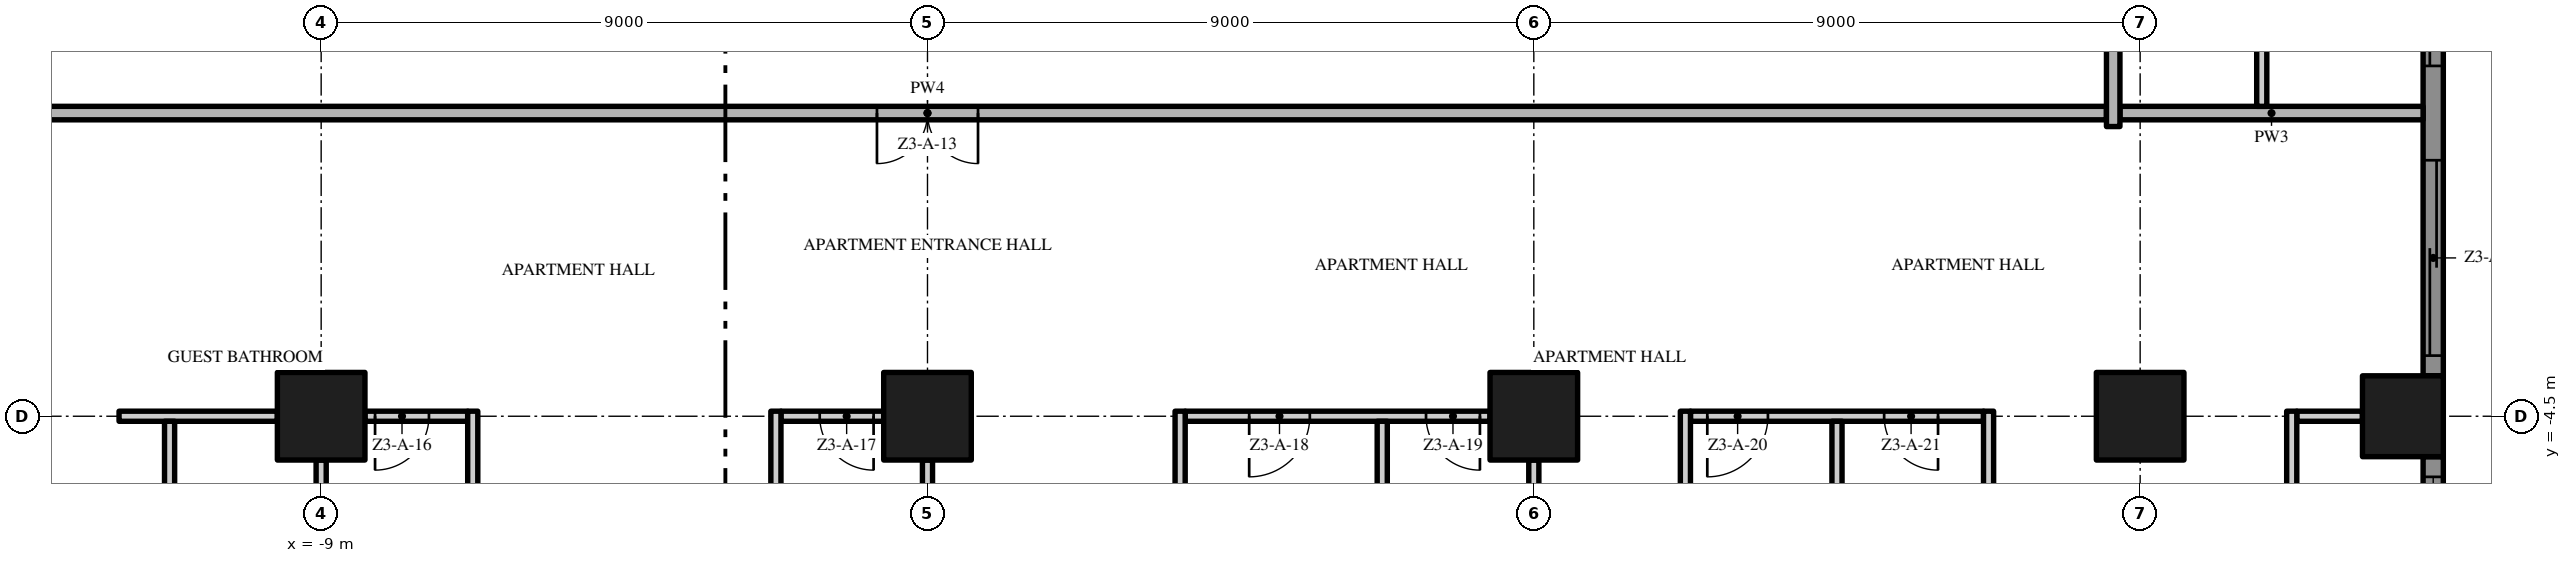
"""IFC4 building model, lengths in metres.
Left out: names, types, materials, properties, quantities, classifications, styles, units other than length and angle.
Written with IfcOpenShell. Run it as: python <this file> out.ifc"""

import sys

from ifc_helpers import new_model, si_unit, direction, frame, frame_2d, origin, origin_2d, place, context, subcontext, project, spatial, polyline, rectangle, outline, extrude, element, fill, save


model = new_model("IFC4")
c1 = context("Model", 3, precision=1e-05, world=origin(), true_north=direction((0.0, 1.0)))
c2 = subcontext(c1, "Body", "Model", "MODEL_VIEW")
j1 = project(units=[si_unit("LENGTHUNIT", "METRE"), si_unit("PLANEANGLEUNIT", "RADIAN")], contexts=[c1])
p1 = place(None, origin())
s1 = spatial("IfcSite", under=j1, at=p1, CompositionType="ELEMENT")
p2 = place(p1, origin())
s2 = spatial("IfcBuilding", under=s1, at=p2, CompositionType="ELEMENT")
p3 = place(p2, frame((0.0, 0.0, 125.0)))
s3 = spatial("IfcBuildingStorey", under=s2, at=p3, CompositionType="ELEMENT", Elevation=125.0)
for number, where, z_axis, x_axis in (
    (1, (-9.0, -4.5, 0.0), (0.0, 0.0, 1.0), (1.0, 0.0, 0.0)),
    (2, (0.0, -4.5, 0.0), (0.0, 0.0, 1.0), (1.0, 0.0, 0.0)),
    (3, (18.0, -4.5, 0.0), (0.0, 0.0, 1.0), (1.0, 0.0, 0.0)),
):
    element("IfcColumn", number, at=place(p3, frame(where, z_axis=z_axis, x_axis=x_axis)), inside=s3, PredefinedType="COLUMN", context=c2, shape_type="SweptSolid", body=[
        extrude(rectangle(XDim=1.3, YDim=1.3, at=origin_2d()), origin(), (0.0, 0.0, 1.0), 3.5),
    ])
p4 = place(p3, frame((21.9, -4.5, 0.0), z_axis=(0.0, 0.0, 1.0), x_axis=(1.0, 0.0, 0.0)))
e4 = element("IfcColumn", 4, at=p4, inside=s3, PredefinedType="COLUMN", context=c2, shape_type="SweptSolid", body=[
    extrude(rectangle(XDim=1.2, YDim=1.2, at=origin_2d()), origin(), (0.0, 0.0, 1.0), 3.5),
])
p5 = place(p3, frame((9.0, -4.5, 0.0), z_axis=(0.0, 0.0, 1.0), x_axis=(1.0, 0.0, 0.0)))
e5 = element("IfcColumn", 5, at=p5, inside=s3, PredefinedType="COLUMN", context=c2, shape_type="SweptSolid", body=[
    extrude(rectangle(XDim=1.3, YDim=1.3, at=origin_2d()), origin(), (0.0, 0.0, 1.0), 3.5),
])
p6 = place(p3, frame((22.35, -5.1, 0.0), z_axis=(0.0, 0.0, 1.0), x_axis=(0.0, -1.0, 0.0)))
e6 = element("IfcWall", 6, at=p6, inside=s3, PredefinedType="SOLIDWALL", context=c2, shape_type="SweptSolid", body=[
    extrude(rectangle(XDim=7.2, YDim=0.3, at=frame_2d((3.6, 0.0))), origin(), (0.0, 0.0, 1.0), 3.5),
])
p7 = place(p6, frame((4.6, 0.0, 0.45)))
e7 = element("IfcOpeningElement", 7, at=p7, cuts=e6, PredefinedType="OPENING", context=c2, shape_type="SweptSolid", body=[
    extrude(rectangle(XDim=2.3, YDim=2.65, at=frame_2d((1.15, 1.325))), frame((0.0, 0.16, 0.0), z_axis=(0.0, -1.0, 0.0), x_axis=(1.0, 0.0, 0.0)), (0.0, 0.0, 1.0), 0.32),
])
p8 = place(p6, frame((0.3, 0.0, 0.45)))
e8 = element("IfcOpeningElement", 8, at=p8, cuts=e6, PredefinedType="OPENING", context=c2, shape_type="SweptSolid", body=[
    extrude(rectangle(XDim=2.9, YDim=2.65, at=frame_2d((1.45, 1.325))), frame((0.0, 0.16, 0.0), z_axis=(0.0, -1.0, 0.0), x_axis=(1.0, 0.0, 0.0)), (0.0, 0.0, 1.0), 0.32),
])
p9 = place(p3, frame((22.35, 3.9, 0.0), z_axis=(0.0, 0.0, 1.0), x_axis=(0.0, -1.0, 0.0)))
e9 = element("IfcWall", 9, at=p9, inside=s3, PredefinedType="SOLIDWALL", context=c2, shape_type="SweptSolid", body=[
    extrude(rectangle(XDim=7.8, YDim=0.3, at=frame_2d((3.9, 0.0))), origin(), (0.0, 0.0, 1.0), 3.5),
])
p10 = place(p9, frame((4.6, 0.0, 0.0)))
e10 = element("IfcOpeningElement", 10, at=p10, cuts=e9, PredefinedType="OPENING", context=c2, shape_type="SweptSolid", body=[
    extrude(rectangle(XDim=2.9, YDim=2.4, at=frame_2d((1.45, 1.2))), frame((0.0, 0.16, 0.0), z_axis=(0.0, -1.0, 0.0), x_axis=(1.0, 0.0, 0.0)), (0.0, 0.0, 1.0), 0.32),
])
p11 = place(p9, frame((0.3, 0.0, 0.0)))
e11 = element("IfcOpeningElement", 11, at=p11, cuts=e9, PredefinedType="OPENING", context=c2, shape_type="SweptSolid", body=[
    extrude(rectangle(XDim=2.9, YDim=2.4, at=frame_2d((1.45, 1.2))), frame((0.0, 0.16, 0.0), z_axis=(0.0, -1.0, 0.0), x_axis=(1.0, 0.0, 0.0)), (0.0, 0.0, 1.0), 0.32),
])
p12 = place(p3, origin())
e12 = element("IfcWall", 12, at=p12, inside=s3, PredefinedType="USERDEFINED", context=c2, shape_type="SweptSolid", body=[
    extrude(outline(polyline([(25.149, -13.5), (24.488, -12.0), (23.755, -10.5), (23.231, -9.0), (23.1, -7.875), (23.115, -7.5), (23.451, -6.0), (24.112, -4.5), (24.845, -3.0), (25.369, -1.5), (25.5, -0.375), (25.485, 0.0), (25.149, 1.5), (24.488, 3.0), (23.755, 4.5), (23.231, 6.0), (23.1, 7.125), (23.115, 7.5), (23.451, 9.0), (24.112, 10.5), (24.845, 12.0), (25.369, 13.5), (25.5, 14.625), (25.485, 15.0), (25.149, 16.5), (24.488, 18.0), (24.259, 17.899), (24.91, 16.421), (25.236, 14.967), (25.249, 14.635), (25.124, 13.556), (24.614, 12.096), (23.885, 10.605), (23.213, 9.079), (22.866, 7.533), (22.849, 7.115), (22.986, 5.944), (23.524, 4.404), (24.261, 2.895), (24.91, 1.421), (25.236, -0.033), (25.249, -0.365), (25.124, -1.444), (24.614, -2.904), (23.885, -4.395), (23.213, -5.921), (22.866, -7.467), (22.849, -7.885), (22.986, -9.056), (23.524, -10.596), (24.261, -12.105), (24.92, -13.601), (25.149, -13.5)])), origin(), (0.0, 0.0, 1.0), 0.9),
])
p13 = place(p3, frame((-12.0, -4.5, 0.0), z_axis=(0.0, 0.0, 1.0), x_axis=(1.0, 0.0, 0.0)))
e13 = element("IfcWall", 13, at=p13, inside=s3, PredefinedType="PARTITIONING", context=c2, shape_type="SweptSolid", body=[
    extrude(rectangle(XDim=2.35, YDim=0.15, at=frame_2d((1.175, 0.0))), origin(), (0.0, 0.0, 1.0), 3.5),
])
p14 = place(p3, frame((-6.825, -4.5, 0.0), z_axis=(0.0, 0.0, 1.0), x_axis=(-1.0, 0.0, 0.0)))
e14 = element("IfcWall", 14, at=p14, inside=s3, PredefinedType="PARTITIONING", context=c2, shape_type="SweptSolid", body=[
    extrude(rectangle(XDim=1.525, YDim=0.15, at=frame_2d((0.762, 0.0))), origin(), (0.0, 0.0, 1.0), 3.5),
])
p15 = place(p14, frame((0.575, 0.0, 0.0)))
e15 = element("IfcOpeningElement", 15, at=p15, cuts=e14, PredefinedType="OPENING", context=c2, shape_type="SweptSolid", body=[
    extrude(rectangle(XDim=0.8, YDim=2.0, at=frame_2d((0.4, 1.0))), frame((0.0, 0.085, 0.0), z_axis=(0.0, -1.0, 0.0), x_axis=(1.0, 0.0, 0.0)), (0.0, 0.0, 1.0), 0.17),
])
p16 = place(p3, frame((-0.65, -4.5, 0.0), z_axis=(0.0, 0.0, 1.0), x_axis=(-1.0, 0.0, 0.0)))
e16 = element("IfcWall", 16, at=p16, inside=s3, PredefinedType="PARTITIONING", context=c2, shape_type="SweptSolid", body=[
    extrude(rectangle(XDim=1.525, YDim=0.15, at=frame_2d((0.762, 0.0))), origin(), (0.0, 0.0, 1.0), 3.5),
])
p17 = place(p16, frame((0.15, 0.0, 0.0)))
e17 = element("IfcOpeningElement", 17, at=p17, cuts=e16, PredefinedType="OPENING", context=c2, shape_type="SweptSolid", body=[
    extrude(rectangle(XDim=0.8, YDim=2.0, at=frame_2d((0.4, 1.0))), frame((0.0, 0.085, 0.0), z_axis=(0.0, -1.0, 0.0), x_axis=(1.0, 0.0, 0.0)), (0.0, 0.0, 1.0), 0.17),
])
p18 = place(p3, frame((8.35, -4.5, 0.0), z_axis=(0.0, 0.0, 1.0), x_axis=(-1.0, 0.0, 0.0)))
e18 = element("IfcWall", 18, at=p18, inside=s3, PredefinedType="PARTITIONING", context=c2, shape_type="SweptSolid", body=[
    extrude(rectangle(XDim=4.525, YDim=0.15, at=frame_2d((2.263, 0.0))), origin(), (0.0, 0.0, 1.0), 3.5),
])
p19 = place(p18, frame((2.675, 0.0, 0.0)))
e19 = element("IfcOpeningElement", 19, at=p19, cuts=e18, PredefinedType="OPENING", context=c2, shape_type="SweptSolid", body=[
    extrude(rectangle(XDim=0.9, YDim=2.1, at=frame_2d((0.45, 1.05))), frame((0.0, 0.085, 0.0), z_axis=(0.0, -1.0, 0.0), x_axis=(1.0, 0.0, 0.0)), (0.0, 0.0, 1.0), 0.17),
])
p20 = place(p18, frame((0.15, 0.0, 0.0)))
e20 = element("IfcOpeningElement", 20, at=p20, cuts=e18, PredefinedType="OPENING", context=c2, shape_type="SweptSolid", body=[
    extrude(rectangle(XDim=0.8, YDim=2.0, at=frame_2d((0.4, 1.0))), frame((0.0, 0.085, 0.0), z_axis=(0.0, -1.0, 0.0), x_axis=(1.0, 0.0, 0.0)), (0.0, 0.0, 1.0), 0.17),
])
p21 = place(p3, frame((15.675, -4.5, 0.0), z_axis=(0.0, 0.0, 1.0), x_axis=(-1.0, 0.0, 0.0)))
e21 = element("IfcWall", 21, at=p21, inside=s3, PredefinedType="PARTITIONING", context=c2, shape_type="SweptSolid", body=[
    extrude(rectangle(XDim=4.35, YDim=0.15, at=frame_2d((2.175, 0.0))), origin(), (0.0, 0.0, 1.0), 3.5),
])
p22 = place(p21, frame((3.2, 0.0, 0.0)))
e22 = element("IfcOpeningElement", 22, at=p22, cuts=e21, PredefinedType="OPENING", context=c2, shape_type="SweptSolid", body=[
    extrude(rectangle(XDim=0.9, YDim=2.1, at=frame_2d((0.45, 1.05))), frame((0.0, 0.085, 0.0), z_axis=(0.0, -1.0, 0.0), x_axis=(1.0, 0.0, 0.0)), (0.0, 0.0, 1.0), 0.17),
])
p23 = place(p21, frame((0.675, 0.0, 0.0)))
e23 = element("IfcOpeningElement", 23, at=p23, cuts=e21, PredefinedType="OPENING", context=c2, shape_type="SweptSolid", body=[
    extrude(rectangle(XDim=0.8, YDim=2.0, at=frame_2d((0.4, 1.0))), frame((0.0, 0.085, 0.0), z_axis=(0.0, -1.0, 0.0), x_axis=(1.0, 0.0, 0.0)), (0.0, 0.0, 1.0), 0.17),
])
p24 = place(p3, frame((20.325, -4.5, 0.0), z_axis=(0.0, 0.0, 1.0), x_axis=(1.0, 0.0, 0.0)))
e24 = element("IfcWall", 24, at=p24, inside=s3, PredefinedType="PARTITIONING", context=c2, shape_type="SweptSolid", body=[
    extrude(rectangle(XDim=0.975, YDim=0.15, at=frame_2d((0.487, 0.0))), origin(), (0.0, 0.0, 1.0), 3.5),
])
p25 = place(p3, frame((17.5, 0.0, 0.0), z_axis=(0.0, 0.0, 1.0), x_axis=(-1.0, 0.0, 0.0)))
e25 = element("IfcWall", 25, at=p25, inside=s3, PredefinedType="PARTITIONING", context=c2, shape_type="SweptSolid", body=[
    extrude(rectangle(XDim=35.0, YDim=0.2, at=frame_2d((17.5, 0.0))), origin(), (0.0, 0.0, 1.0), 3.5),
])
p26 = place(p25, frame((16.75, 0.0, 0.0)))
e26 = element("IfcOpeningElement", 26, at=p26, cuts=e25, PredefinedType="OPENING", context=c2, shape_type="SweptSolid", body=[
    extrude(rectangle(XDim=1.5, YDim=2.4, at=frame_2d((0.75, 1.2))), frame((0.0, 0.11, 0.0), z_axis=(0.0, -1.0, 0.0), x_axis=(1.0, 0.0, 0.0)), (0.0, 0.0, 1.0), 0.22),
])
p27 = place(p3, frame((17.7, 0.0, 0.0), z_axis=(0.0, 0.0, 1.0), x_axis=(1.0, 0.0, 0.0)))
e27 = element("IfcWall", 27, at=p27, inside=s3, PredefinedType="PARTITIONING", context=c2, shape_type="SweptSolid", body=[
    extrude(rectangle(XDim=4.5, YDim=0.2, at=frame_2d((2.25, 0.0))), origin(), (0.0, 0.0, 1.0), 3.5),
])
p28 = place(p3, frame((-11.25, -4.575, 0.0), z_axis=(0.0, 0.0, 1.0), x_axis=(0.0, -1.0, 0.0)))
e28 = element("IfcWall", 28, at=p28, inside=s3, PredefinedType="PARTITIONING", context=c2, shape_type="SweptSolid", body=[
    extrude(rectangle(XDim=7.5, YDim=0.15, at=frame_2d((3.75, 0.0))), origin(), (0.0, 0.0, 1.0), 3.5),
])
p29 = place(p28, frame((1.725, 0.0, 0.0)))
e29 = element("IfcOpeningElement", 29, at=p29, cuts=e28, PredefinedType="OPENING", context=c2, shape_type="SweptSolid", body=[
    extrude(rectangle(XDim=0.9, YDim=2.1, at=frame_2d((0.45, 1.05))), frame((0.0, 0.085, 0.0), z_axis=(0.0, -1.0, 0.0), x_axis=(1.0, 0.0, 0.0)), (0.0, 0.0, 1.0), 0.17),
])
p30 = place(p3, frame((-9.0, -12.85, 0.0), z_axis=(0.0, 0.0, 1.0), x_axis=(0.0, 1.0, 0.0)))
e30 = element("IfcWall", 30, at=p30, inside=s3, PredefinedType="PARTITIONING", context=c2, shape_type="SweptSolid", body=[
    extrude(rectangle(XDim=7.7, YDim=0.15, at=frame_2d((3.85, 0.0))), origin(), (0.0, 0.0, 1.0), 3.5),
])
p31 = place(p3, frame((-6.75, -12.075, 0.0), z_axis=(0.0, 0.0, 1.0), x_axis=(0.0, 1.0, 0.0)))
e31 = element("IfcWall", 31, at=p31, inside=s3, PredefinedType="PARTITIONING", context=c2, shape_type="SweptSolid", body=[
    extrude(rectangle(XDim=7.65, YDim=0.15, at=frame_2d((3.825, 0.0))), origin(), (0.0, 0.0, 1.0), 3.5),
])
p32 = place(p3, frame((-2.25, -8.925, 0.0), z_axis=(0.0, 0.0, 1.0), x_axis=(0.0, 1.0, 0.0)))
e32 = element("IfcWall", 32, at=p32, inside=s3, PredefinedType="PARTITIONING", context=c2, shape_type="SweptSolid", body=[
    extrude(rectangle(XDim=4.5, YDim=0.15, at=frame_2d((2.25, 0.0))), origin(), (0.0, 0.0, 1.0), 3.5),
])
p33 = place(p3, frame((0.0, -12.85, 0.0), z_axis=(0.0, 0.0, 1.0), x_axis=(0.0, 1.0, 0.0)))
e33 = element("IfcWall", 33, at=p33, inside=s3, PredefinedType="PARTITIONING", context=c2, shape_type="SweptSolid", body=[
    extrude(rectangle(XDim=7.7, YDim=0.15, at=frame_2d((3.85, 0.0))), origin(), (0.0, 0.0, 1.0), 3.5),
])
p34 = place(p3, frame((3.75, -8.925, 0.0), z_axis=(0.0, 0.0, 1.0), x_axis=(0.0, 1.0, 0.0)))
e34 = element("IfcWall", 34, at=p34, inside=s3, PredefinedType="PARTITIONING", context=c2, shape_type="SweptSolid", body=[
    extrude(rectangle(XDim=4.5, YDim=0.15, at=frame_2d((2.25, 0.0))), origin(), (0.0, 0.0, 1.0), 3.5),
])
p35 = place(p3, frame((6.75, -8.925, 0.0), z_axis=(0.0, 0.0, 1.0), x_axis=(0.0, 1.0, 0.0)))
e35 = element("IfcWall", 35, at=p35, inside=s3, PredefinedType="PARTITIONING", context=c2, shape_type="SweptSolid", body=[
    extrude(rectangle(XDim=4.35, YDim=0.15, at=frame_2d((2.175, 0.0))), origin(), (0.0, 0.0, 1.0), 3.5),
])
p36 = place(p3, frame((9.0, -12.85, 0.0), z_axis=(0.0, 0.0, 1.0), x_axis=(0.0, 1.0, 0.0)))
e36 = element("IfcWall", 36, at=p36, inside=s3, PredefinedType="PARTITIONING", context=c2, shape_type="SweptSolid", body=[
    extrude(rectangle(XDim=7.7, YDim=0.15, at=frame_2d((3.85, 0.0))), origin(), (0.0, 0.0, 1.0), 3.5),
])
p37 = place(p3, frame((11.25, -12.075, 0.0), z_axis=(0.0, 0.0, 1.0), x_axis=(0.0, 1.0, 0.0)))
e37 = element("IfcWall", 37, at=p37, inside=s3, PredefinedType="PARTITIONING", context=c2, shape_type="SweptSolid", body=[
    extrude(rectangle(XDim=7.65, YDim=0.15, at=frame_2d((3.825, 0.0))), origin(), (0.0, 0.0, 1.0), 3.5),
])
p38 = place(p3, frame((13.5, -17.7, 0.0), z_axis=(0.0, 0.0, 1.0), x_axis=(0.0, 1.0, 0.0)))
e38 = element("IfcWall", 38, at=p38, inside=s3, PredefinedType="PARTITIONING", context=c2, shape_type="SweptSolid", body=[
    extrude(rectangle(XDim=13.125, YDim=0.15, at=frame_2d((6.562, 0.0))), origin(), (0.0, 0.0, 1.0), 3.5),
])
p39 = place(p3, frame((15.75, -12.075, 0.0), z_axis=(0.0, 0.0, 1.0), x_axis=(0.0, 1.0, 0.0)))
e39 = element("IfcWall", 39, at=p39, inside=s3, PredefinedType="PARTITIONING", context=c2, shape_type="SweptSolid", body=[
    extrude(rectangle(XDim=7.65, YDim=0.15, at=frame_2d((3.825, 0.0))), origin(), (0.0, 0.0, 1.0), 3.5),
])
p40 = place(p3, frame((17.6, -0.2, 0.0), z_axis=(0.0, 0.0, 1.0), x_axis=(0.0, 1.0, 0.0)))
e40 = element("IfcWall", 40, at=p40, inside=s3, PredefinedType="PARTITIONING", context=c2, shape_type="SweptSolid", body=[
    extrude(rectangle(XDim=4.05, YDim=0.2, at=frame_2d((2.025, 0.0))), origin(), (0.0, 0.0, 1.0), 3.5),
])
p41 = place(p3, frame((19.805, 0.1, 0.0), z_axis=(0.0, 0.0, 1.0), x_axis=(0.0, 1.0, 0.0)))
e41 = element("IfcWall", 41, at=p41, inside=s3, PredefinedType="PARTITIONING", context=c2, shape_type="SweptSolid", body=[
    extrude(rectangle(XDim=2.225, YDim=0.15, at=frame_2d((1.113, 0.0))), origin(), (0.0, 0.0, 1.0), 3.5),
])
p42 = place(p3, frame((20.25, -4.425, 0.0), z_axis=(0.0, 0.0, 1.0), x_axis=(0.0, -1.0, 0.0)))
e42 = element("IfcWall", 42, at=p42, inside=s3, PredefinedType="PARTITIONING", context=c2, shape_type="SweptSolid", body=[
    extrude(rectangle(XDim=4.5, YDim=0.15, at=frame_2d((2.25, 0.0))), origin(), (0.0, 0.0, 1.0), 3.5),
])
p43 = place(p42, frame((1.95, 0.0, 0.0)))
e43 = element("IfcOpeningElement", 43, at=p43, cuts=e42, PredefinedType="OPENING", context=c2, shape_type="SweptSolid", body=[
    extrude(rectangle(XDim=0.8, YDim=2.0, at=frame_2d((0.4, 1.0))), frame((0.0, 0.085, 0.0), z_axis=(0.0, -1.0, 0.0), x_axis=(1.0, 0.0, 0.0)), (0.0, 0.0, 1.0), 0.17),
])
p44 = place(p8, origin())
e44 = element("IfcWindow", 44, at=p44, inside=s3, PartitioningType="SINGLE_PANEL", PredefinedType="WINDOW", context=c2, shape_type="SweptSolid", body=[
    extrude(rectangle(XDim=2.9, YDim=2.65, at=frame_2d((1.45, 1.325))), frame((0.0, 0.03, 0.0), z_axis=(0.0, -1.0, 0.0), x_axis=(1.0, 0.0, 0.0)), (0.0, 0.0, 1.0), 0.06),
])
fill(e8, e44)
p45 = place(p10, origin())
e45 = element("IfcDoor", 45, at=p45, inside=s3, OperationType="SINGLE_SWING_LEFT", PredefinedType="DOOR", context=c2, shape_type="SweptSolid", body=[
    extrude(rectangle(XDim=2.9, YDim=2.4, at=frame_2d((1.45, 1.2))), frame((0.0, 0.025, 0.0), z_axis=(0.0, -1.0, 0.0), x_axis=(1.0, 0.0, 0.0)), (0.0, 0.0, 1.0), 0.05),
])
fill(e10, e45)
p46 = place(p11, origin())
e46 = element("IfcDoor", 46, at=p46, inside=s3, OperationType="SINGLE_SWING_LEFT", PredefinedType="DOOR", context=c2, shape_type="SweptSolid", body=[
    extrude(rectangle(XDim=2.9, YDim=2.4, at=frame_2d((1.45, 1.2))), frame((0.0, 0.025, 0.0), z_axis=(0.0, -1.0, 0.0), x_axis=(1.0, 0.0, 0.0)), (0.0, 0.0, 1.0), 0.05),
])
fill(e11, e46)
p47 = place(p26, origin())
e47 = element("IfcDoor", 47, at=p47, inside=s3, OperationType="DOUBLE_DOOR_SINGLE_SWING", PredefinedType="DOOR", context=c2, shape_type="SweptSolid", body=[
    extrude(rectangle(XDim=1.5, YDim=2.4, at=frame_2d((0.75, 1.2))), frame((0.0, 0.025, 0.0), z_axis=(0.0, -1.0, 0.0), x_axis=(1.0, 0.0, 0.0)), (0.0, 0.0, 1.0), 0.05),
])
fill(e26, e47)
p48 = place(p15, origin())
e48 = element("IfcDoor", 48, at=p48, inside=s3, OperationType="SINGLE_SWING_RIGHT", PredefinedType="DOOR", context=c2, shape_type="SweptSolid", body=[
    extrude(rectangle(XDim=0.8, YDim=2.0, at=frame_2d((0.4, 1.0))), frame((0.0, 0.025, 0.0), z_axis=(0.0, -1.0, 0.0), x_axis=(1.0, 0.0, 0.0)), (0.0, 0.0, 1.0), 0.05),
])
fill(e15, e48)
p49 = place(p17, origin())
e49 = element("IfcDoor", 49, at=p49, inside=s3, OperationType="SINGLE_SWING_LEFT", PredefinedType="DOOR", context=c2, shape_type="SweptSolid", body=[
    extrude(rectangle(XDim=0.8, YDim=2.0, at=frame_2d((0.4, 1.0))), frame((0.0, 0.025, 0.0), z_axis=(0.0, -1.0, 0.0), x_axis=(1.0, 0.0, 0.0)), (0.0, 0.0, 1.0), 0.05),
])
fill(e17, e49)
p50 = place(p19, origin())
e50 = element("IfcDoor", 50, at=p50, inside=s3, OperationType="SINGLE_SWING_RIGHT", PredefinedType="DOOR", context=c2, shape_type="SweptSolid", body=[
    extrude(rectangle(XDim=0.9, YDim=2.1, at=frame_2d((0.45, 1.05))), frame((0.0, 0.025, 0.0), z_axis=(0.0, -1.0, 0.0), x_axis=(1.0, 0.0, 0.0)), (0.0, 0.0, 1.0), 0.05),
])
fill(e19, e50)
p51 = place(p20, origin())
e51 = element("IfcDoor", 51, at=p51, inside=s3, OperationType="SINGLE_SWING_LEFT", PredefinedType="DOOR", context=c2, shape_type="SweptSolid", body=[
    extrude(rectangle(XDim=0.8, YDim=2.0, at=frame_2d((0.4, 1.0))), frame((0.0, 0.025, 0.0), z_axis=(0.0, -1.0, 0.0), x_axis=(1.0, 0.0, 0.0)), (0.0, 0.0, 1.0), 0.05),
])
fill(e20, e51)
p52 = place(p22, origin())
e52 = element("IfcDoor", 52, at=p52, inside=s3, OperationType="SINGLE_SWING_RIGHT", PredefinedType="DOOR", context=c2, shape_type="SweptSolid", body=[
    extrude(rectangle(XDim=0.9, YDim=2.1, at=frame_2d((0.45, 1.05))), frame((0.0, 0.025, 0.0), z_axis=(0.0, -1.0, 0.0), x_axis=(1.0, 0.0, 0.0)), (0.0, 0.0, 1.0), 0.05),
])
fill(e22, e52)
p53 = place(p23, origin())
e53 = element("IfcDoor", 53, at=p53, inside=s3, OperationType="SINGLE_SWING_LEFT", PredefinedType="DOOR", context=c2, shape_type="SweptSolid", body=[
    extrude(rectangle(XDim=0.8, YDim=2.0, at=frame_2d((0.4, 1.0))), frame((0.0, 0.025, 0.0), z_axis=(0.0, -1.0, 0.0), x_axis=(1.0, 0.0, 0.0)), (0.0, 0.0, 1.0), 0.05),
])
fill(e23, e53)
save(model, sys.argv[1])
